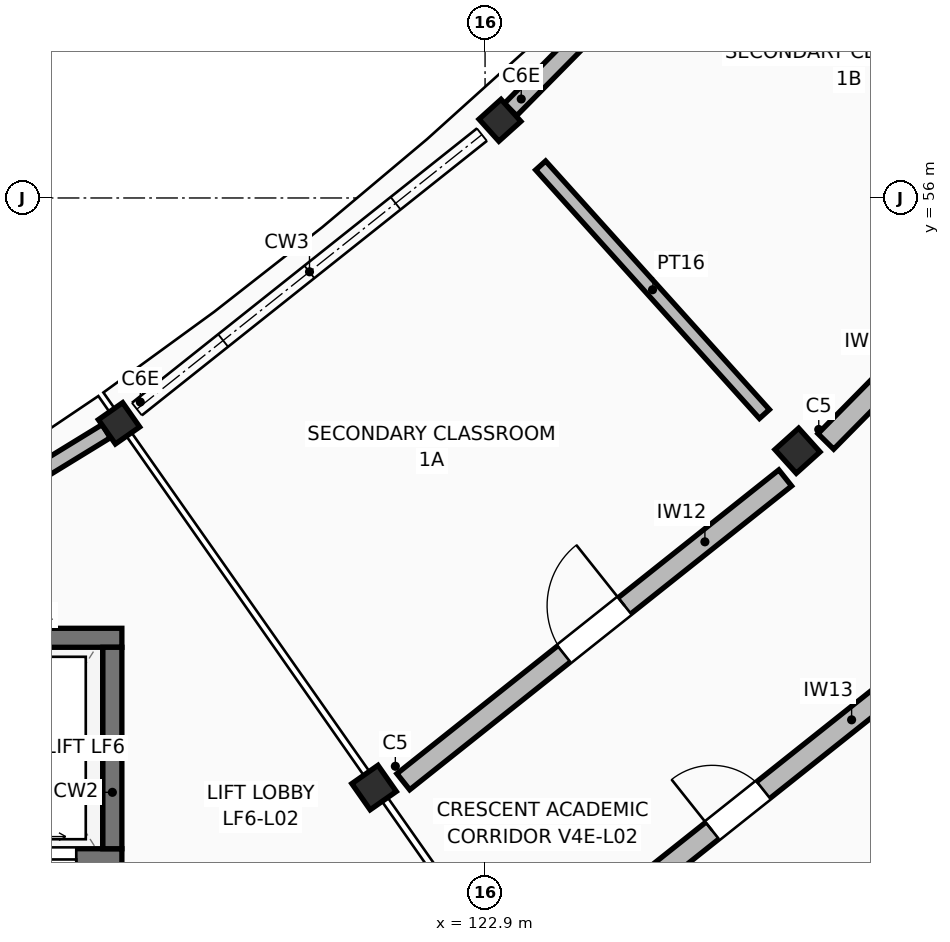
"""IFC4 building model, lengths in metres.
Left out: names, types, materials, properties, quantities, classifications, styles, units other than length and angle.
Written with IfcOpenShell. Run it as: python <this file> out.ifc"""

import sys

from ifc_helpers import new_model, si_unit, direction, frame, frame_2d, origin, origin_2d, place, context, subcontext, project, spatial, rectangle, extrude, element, fill, save


model = new_model("IFC4")
c1 = context("Model", 3, precision=1e-05, world=origin(), true_north=direction((0.0, 1.0)))
c2 = subcontext(c1, "Body", "Model", "MODEL_VIEW")
j1 = project(units=[si_unit("LENGTHUNIT", "METRE"), si_unit("PLANEANGLEUNIT", "RADIAN")], contexts=[c1])
p1 = place(None, origin())
s1 = spatial("IfcSite", under=j1, at=p1, CompositionType="ELEMENT")
p2 = place(p1, origin())
s2 = spatial("IfcBuilding", under=s1, at=p2, CompositionType="ELEMENT")
p3 = place(p2, frame((0.0, 0.0, 8.16)))
s3 = spatial("IfcBuildingStorey", under=s2, at=p3, CompositionType="ELEMENT", Elevation=8.16)
p4 = place(p3, frame((118.084, 53.035, 0.0), z_axis=(0.0, 0.0, 1.0), x_axis=(0.573576436351, -0.819152044289, 0.0)))
e1 = element("IfcColumn", 1, at=p4, inside=s3, PredefinedType="COLUMN", context=c2, shape_type="SweptSolid", body=[
    extrude(rectangle(XDim=0.39, YDim=0.39, at=origin_2d()), origin(), (0.0, 0.0, 1.0), 3.74),
])
p5 = place(p3, frame((121.439, 48.243, 0.0), z_axis=(0.0, 0.0, 1.0), x_axis=(0.573576436351, -0.819152044289, 0.0)))
e2 = element("IfcColumn", 2, at=p5, inside=s3, PredefinedType="COLUMN", context=c2, shape_type="SweptSolid", body=[
    extrude(rectangle(XDim=0.42, YDim=0.42, at=origin_2d()), origin(), (0.0, 0.0, 1.0), 3.74),
])
p6 = place(p3, frame((123.096, 57.022, 0.0), z_axis=(0.0, 0.0, 1.0), x_axis=(0.669130606359, -0.743144825477, 0.0)))
e3 = element("IfcColumn", 3, at=p6, inside=s3, PredefinedType="COLUMN", context=c2, shape_type="SweptSolid", body=[
    extrude(rectangle(XDim=0.39, YDim=0.39, at=origin_2d()), origin(), (0.0, 0.0, 1.0), 3.74),
])
p7 = place(p3, frame((127.01, 52.675, 0.0), z_axis=(0.0, 0.0, 1.0), x_axis=(0.669130606359, -0.743144825477, 0.0)))
e4 = element("IfcColumn", 4, at=p7, inside=s3, PredefinedType="COLUMN", context=c2, shape_type="SweptSolid", body=[
    extrude(rectangle(XDim=0.42, YDim=0.42, at=origin_2d()), origin(), (0.0, 0.0, 1.0), 3.74),
])
p8 = place(p3, frame((115.771, 50.214, 0.0), z_axis=(0.0, 0.0, 1.0), x_axis=(1.0, 0.0, 0.0)))
e5 = element("IfcWall", 5, at=p8, inside=s3, PredefinedType="SHEAR", context=c2, shape_type="SweptSolid", body=[
    extrude(rectangle(XDim=2.35, YDim=0.25, at=frame_2d((1.175, 0.0))), origin(), (0.0, 0.0, 1.0), 3.49),
])
p9 = place(p3, frame((115.771, 47.314, 0.0), z_axis=(0.0, 0.0, 1.0), x_axis=(1.0, 0.0, 0.0)))
e6 = element("IfcWall", 6, at=p9, inside=s3, PredefinedType="SHEAR", context=c2, shape_type="SweptSolid", body=[
    extrude(rectangle(XDim=2.35, YDim=0.25, at=frame_2d((1.175, 0.0))), origin(), (0.0, 0.0, 1.0), 3.49),
])
p10 = place(p9, frame((0.6, 0.0, 0.0)))
e7 = element("IfcOpeningElement", 7, at=p10, cuts=e6, PredefinedType="OPENING", context=c2, shape_type="SweptSolid", body=[
    extrude(rectangle(XDim=1.15, YDim=2.15, at=frame_2d((0.575, 1.075))), frame((0.0, 0.135, 0.0), z_axis=(0.0, -1.0, 0.0), x_axis=(1.0, 0.0, 0.0)), (0.0, 0.0, 1.0), 0.27),
])
p11 = place(p3, frame((117.996, 47.439, 0.0), z_axis=(0.0, 0.0, 1.0), x_axis=(0.0, 1.0, 0.0)))
e8 = element("IfcWall", 8, at=p11, inside=s3, PredefinedType="SHEAR", context=c2, shape_type="SweptSolid", body=[
    extrude(rectangle(XDim=2.65, YDim=0.25, at=frame_2d((1.325, 0.0))), origin(), (0.0, 0.0, 1.0), 3.49),
])
p12 = place(p3, frame((112.793, 49.793, 0.0), z_axis=(0.0, 0.0, 1.0), x_axis=(0.85263629261, 0.522504882775, 0.0)))
e9 = element("IfcWall", 9, at=p12, inside=s3, PredefinedType="STANDARD", context=c2, shape_type="SweptSolid", body=[
    extrude(rectangle(XDim=6.008, YDim=0.204, at=frame_2d((3.004, 0.0))), origin(), (0.0, 0.0, 1.0), 2.78),
])
p13 = place(p12, frame((1.854, 0.0, 0.95)))
e10 = element("IfcOpeningElement", 10, at=p13, cuts=e9, PredefinedType="OPENING", context=c2, shape_type="SweptSolid", body=[
    extrude(rectangle(XDim=2.3, YDim=1.45, at=frame_2d((1.15, 0.725))), frame((0.0, 0.112, 0.0), z_axis=(0.0, -1.0, 0.0), x_axis=(1.0, 0.0, 0.0)), (0.0, 0.0, 1.0), 0.224),
])
p14 = place(p3, frame((123.235, 57.163, 0.0), z_axis=(0.0, 0.0, 1.0), x_axis=(0.702392539927, 0.711789800331, 0.0)))
e11 = element("IfcWall", 11, at=p14, inside=s3, PredefinedType="STANDARD", context=c2, shape_type="SweptSolid", body=[
    extrude(rectangle(XDim=5.793, YDim=0.228, at=frame_2d((2.897, 0.0))), origin(), (0.0, 0.0, 1.0), 2.78),
])
p15 = place(p14, frame((1.687, 0.0, 0.95)))
e12 = element("IfcOpeningElement", 12, at=p15, cuts=e11, PredefinedType="OPENING", context=c2, shape_type="SweptSolid", body=[
    extrude(rectangle(XDim=2.42, YDim=1.15, at=frame_2d((1.21, 0.575))), frame((0.0, 0.124, 0.0), z_axis=(0.0, -1.0, 0.0), x_axis=(1.0, 0.0, 0.0)), (0.0, 0.0, 1.0), 0.248),
])
p16 = place(p3, frame((127.592, 61.297, 0.0), z_axis=(0.0, 0.0, 1.0), x_axis=(0.752014754072, -0.65914627334, 0.0)))
e13 = element("IfcWall", 13, at=p16, inside=s3, PredefinedType="STANDARD", context=c2, shape_type="SweptSolid", body=[
    extrude(rectangle(XDim=5.439, YDim=0.3, at=frame_2d((2.72, 0.0))), origin(), (0.0, 0.0, 1.0), 2.78),
])
p17 = place(p3, frame((121.824, 48.32, 0.0), z_axis=(0.0, 0.0, 1.0), x_axis=(0.782605685559, 0.622517743467, 0.0)))
e14 = element("IfcWall", 14, at=p17, inside=s3, PredefinedType="STANDARD", context=c2, shape_type="SweptSolid", body=[
    extrude(rectangle(XDim=6.42, YDim=0.27, at=frame_2d((3.21, 0.0))), origin(), (0.0, 0.0, 1.0), 2.75),
])
p18 = place(p17, frame((2.7, 0.0, 0.0)))
e15 = element("IfcOpeningElement", 15, at=p18, cuts=e14, PredefinedType="OPENING", context=c2, shape_type="SweptSolid", body=[
    extrude(rectangle(XDim=1.02, YDim=2.24, at=frame_2d((0.51, 1.12))), frame((0.0, 0.145, 0.0), z_axis=(0.0, -1.0, 0.0), x_axis=(1.0, 0.0, 0.0)), (0.0, 0.0, 1.0), 0.29),
])
p19 = place(p3, frame((123.568, 45.83, 0.0), z_axis=(0.0, 0.0, 1.0), x_axis=(0.782615780998, 0.622505051653, 0.0)))
e16 = element("IfcWall", 16, at=p19, inside=s3, PredefinedType="STANDARD", context=c2, shape_type="SweptSolid", body=[
    extrude(rectangle(XDim=6.792, YDim=0.28, at=frame_2d((3.396, 0.0))), origin(), (0.0, 0.0, 1.0), 2.75),
])
p20 = place(p19, frame((2.966, 0.0, 0.0)))
e17 = element("IfcOpeningElement", 17, at=p20, cuts=e16, PredefinedType="OPENING", context=c2, shape_type="SweptSolid", body=[
    extrude(rectangle(XDim=0.86, YDim=2.06, at=frame_2d((0.43, 1.03))), frame((0.0, 0.15, 0.0), z_axis=(0.0, -1.0, 0.0), x_axis=(1.0, 0.0, 0.0)), (0.0, 0.0, 1.0), 0.3),
])
p21 = place(p3, frame((127.384, 52.797, 0.0), z_axis=(0.0, 0.0, 1.0), x_axis=(0.702370898593, 0.7118111553, 0.0)))
e18 = element("IfcWall", 18, at=p21, inside=s3, PredefinedType="STANDARD", context=c2, shape_type="SweptSolid", body=[
    extrude(rectangle(XDim=6.181, YDim=0.29, at=frame_2d((3.09, 0.0))), origin(), (0.0, 0.0, 1.0), 2.75),
])
p22 = place(p21, frame((2.66, 0.0, 0.0)))
e19 = element("IfcOpeningElement", 19, at=p22, cuts=e18, PredefinedType="OPENING", context=c2, shape_type="SweptSolid", body=[
    extrude(rectangle(XDim=0.86, YDim=2.12, at=frame_2d((0.43, 1.06))), frame((0.0, 0.155, 0.0), z_axis=(0.0, -1.0, 0.0), x_axis=(1.0, 0.0, 0.0)), (0.0, 0.0, 1.0), 0.31),
])
p23 = place(p3, frame((123.631, 56.427, 0.0), z_axis=(0.0, 0.0, 1.0), x_axis=(0.669157836149, -0.743120306761, 0.0)))
e20 = element("IfcWall", 20, at=p23, inside=s3, PredefinedType="PARTITIONING", context=c2, shape_type="SweptSolid", body=[
    extrude(rectangle(XDim=4.4, YDim=0.176, at=frame_2d((2.2, 0.0))), origin(), (0.0, 0.0, 1.0), 2.75),
])
p24 = place(p10, origin())
e21 = element("IfcDoor", 21, at=p24, inside=s3, OperationType="DOUBLE_DOOR_SLIDING", PredefinedType="DOOR", context=c2, shape_type="SweptSolid", body=[
    extrude(rectangle(XDim=1.15, YDim=2.15, at=frame_2d((0.575, 1.075))), frame((0.0, 0.025, 0.0), z_axis=(0.0, -1.0, 0.0), x_axis=(1.0, 0.0, 0.0)), (0.0, 0.0, 1.0), 0.05),
])
fill(e7, e21)
p25 = place(p18, frame((1.02, 0.0, 0.0), z_axis=(0.0, 0.0, 1.0), x_axis=(-1.0, 0.0, 0.0)))
e22 = element("IfcDoor", 22, at=p25, inside=s3, OperationType="SINGLE_SWING_RIGHT", PredefinedType="DOOR", context=c2, shape_type="SweptSolid", body=[
    extrude(rectangle(XDim=1.02, YDim=2.24, at=frame_2d((0.51, 1.12))), frame((0.0, 0.025, 0.0), z_axis=(0.0, -1.0, 0.0), x_axis=(1.0, 0.0, 0.0)), (0.0, 0.0, 1.0), 0.05),
])
fill(e15, e22)
p26 = place(p20, origin())
e23 = element("IfcDoor", 23, at=p26, inside=s3, OperationType="SINGLE_SWING_LEFT", PredefinedType="DOOR", context=c2, shape_type="SweptSolid", body=[
    extrude(rectangle(XDim=0.86, YDim=2.06, at=frame_2d((0.43, 1.03))), frame((0.0, 0.025, 0.0), z_axis=(0.0, -1.0, 0.0), x_axis=(1.0, 0.0, 0.0)), (0.0, 0.0, 1.0), 0.05),
])
fill(e17, e23)
save(model, sys.argv[1])
